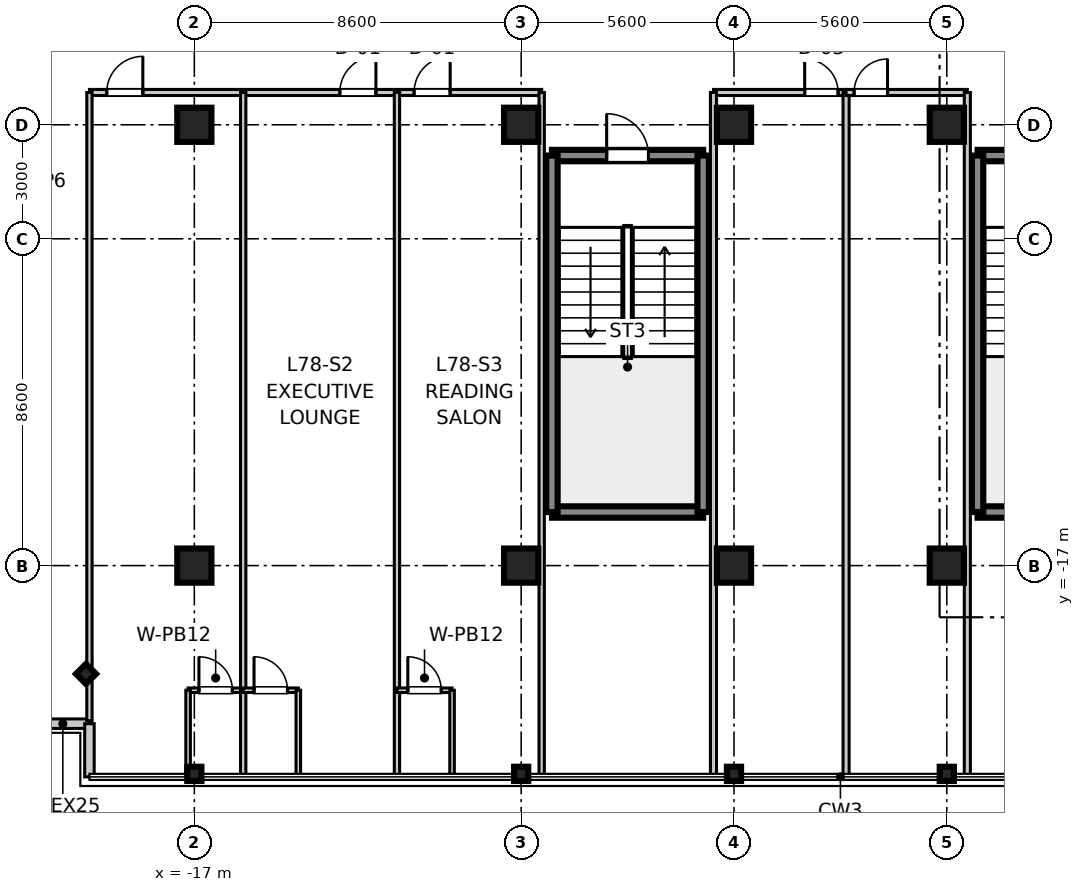
"""IFC4 building model, lengths in metres.
Left out: names, types, materials, properties, quantities, classifications, styles, units other than length and angle.
Written with IfcOpenShell. Run it as: python <this file> out.ifc"""

import sys

from ifc_helpers import new_model, si_unit, direction, frame, frame_2d, origin, origin_2d, place, context, subcontext, project, spatial, rectangle, i_section, extrude, source, transform, mapped, element, fill, save


model = new_model("IFC4")
c1 = context("Model", 3, precision=1e-05, world=origin(), true_north=direction((0.0, 1.0)))
c2 = subcontext(c1, "Body", "Model", "MODEL_VIEW")
j1 = project(units=[si_unit("LENGTHUNIT", "METRE"), si_unit("PLANEANGLEUNIT", "RADIAN")], contexts=[c1])
p1 = place(None, origin())
s1 = spatial("IfcSite", under=j1, at=p1, CompositionType="ELEMENT")
p2 = place(p1, origin())
s2 = spatial("IfcBuilding", under=s1, at=p2, CompositionType="ELEMENT")
p3 = place(p2, frame((0.0, 0.0, 304.2)))
s3 = spatial("IfcBuildingStorey", under=s2, at=p3, CompositionType="ELEMENT", Elevation=304.2)
m1 = source(origin(), c2, "Body", "SweptSolid", [
    extrude(rectangle(XDim=0.9, YDim=0.9, at=origin_2d()), origin(), (0.0, 0.0, 1.0), 3.805),
])
for number, where, z_axis, x_axis in (
    (1, (-17.0, -17.0, 0.0), (0.0, 0.0, 1.0), (1.0, 0.0, 0.0)),
    (2, (-17.0, -5.4, 0.0), (0.0, 0.0, 1.0), (1.0, 0.0, 0.0)),
    (3, (-8.4, -17.0, 0.0), (0.0, 0.0, 1.0), (1.0, 0.0, 0.0)),
    (4, (-8.4, -5.4, 0.0), (0.0, 0.0, 1.0), (1.0, 0.0, 0.0)),
    (5, (-2.8, -17.0, 0.0), (0.0, 0.0, 1.0), (1.0, 0.0, 0.0)),
    (6, (-2.8, -5.4, 0.0), (0.0, 0.0, 1.0), (1.0, 0.0, 0.0)),
    (7, (2.8, -17.0, 0.0), (0.0, 0.0, 1.0), (1.0, 0.0, 0.0)),
    (8, (2.8, -5.4, 0.0), (0.0, 0.0, 1.0), (1.0, 0.0, 0.0)),
):
    element("IfcColumn", number, at=place(p3, frame(where, z_axis=z_axis, x_axis=x_axis)), inside=s3, PredefinedType="COLUMN", context=c2, shape_type="MappedRepresentation", body=[
        mapped(m1, transform((0.0, 0.0, 0.0), scale=1.0)),
    ])
m2 = source(origin(), c2, "Body", "SweptSolid", [
    extrude(i_section(OverallWidth=0.374, OverallDepth=0.374, WebThickness=0.014, FlangeThickness=0.023, at=origin_2d()), origin(), (0.0, 0.0, 1.0), 3.805),
])
for number, where, z_axis, x_axis in (
    (9, (-17.0, -22.48, 0.0), (0.0, 0.0, 1.0), (0.0, 1.0, 0.0)),
    (10, (-8.4, -22.48, 0.0), (0.0, 0.0, 1.0), (0.0, 1.0, 0.0)),
    (11, (-2.8, -22.48, 0.0), (0.0, 0.0, 1.0), (0.0, 1.0, 0.0)),
    (12, (2.8, -22.48, 0.0), (0.0, 0.0, 1.0), (0.0, 1.0, 0.0)),
    (13, (-19.85, -19.85, 0.0), (0.0, 0.0, 1.0), (0.707, 0.707, 0.0)),
):
    element("IfcColumn", number, at=place(p3, frame(where, z_axis=z_axis, x_axis=x_axis)), inside=s3, PredefinedType="COLUMN", context=c2, shape_type="MappedRepresentation", body=[
        mapped(m2, transform((0.0, 0.0, 0.0), scale=1.0)),
    ])
m3 = source(origin(), c2, "Body", "SweptSolid", [
    extrude(rectangle(XDim=3.98, YDim=0.3, at=frame_2d((1.99, 0.0))), origin(), (0.0, 0.0, 1.0), 3.55),
])
for number, where, z_axis, x_axis in (
    (14, (3.61, -15.59, 0.0), (0.0, 0.0, 1.0), (1.0, 0.0, 0.0)),
    (15, (3.61, -6.21, 0.0), (0.0, 0.0, 1.0), (1.0, 0.0, 0.0)),
):
    element("IfcWall", number, at=place(p3, frame(where, z_axis=z_axis, x_axis=x_axis)), inside=s3, PredefinedType="SHEAR", context=c2, shape_type="MappedRepresentation", body=[
        mapped(m3, transform((0.0, 0.0, 0.0), scale=1.0)),
    ])
m4 = source(origin(), c2, "Body", "SweptSolid", [
    extrude(rectangle(XDim=9.38, YDim=0.3, at=frame_2d((4.69, 0.0))), origin(), (0.0, 0.0, 1.0), 3.55),
])
p4 = place(p3, frame((3.61, -15.59, 0.0), z_axis=(0.0, 0.0, 1.0), x_axis=(0.0, 1.0, 0.0)))
e16 = element("IfcWall", 16, at=p4, inside=s3, PredefinedType="SHEAR", context=c2, shape_type="MappedRepresentation", body=[
    mapped(m4, transform((0.0, 0.0, 0.0), scale=1.0)),
])
p5 = place(p3, frame((-7.59, -15.59, 0.0), z_axis=(0.0, 0.0, 1.0), x_axis=(1.0, 0.0, 0.0)))
e17 = element("IfcWall", 17, at=p5, inside=s3, PredefinedType="SHEAR", context=c2, shape_type="MappedRepresentation", body=[
    mapped(m3, transform((0.0, 0.0, 0.0), scale=1.0)),
])
p6 = place(p3, frame((-7.59, -6.21, 0.0), z_axis=(0.0, 0.0, 1.0), x_axis=(1.0, 0.0, 0.0)))
e18 = element("IfcWall", 18, at=p6, inside=s3, PredefinedType="SHEAR", context=c2, shape_type="MappedRepresentation", body=[
    mapped(m3, transform((0.0, 0.0, 0.0), scale=1.0)),
])
p7 = place(p6, frame((1.44, 0.0, 0.0)))
e19 = element("IfcOpeningElement", 19, at=p7, cuts=e18, PredefinedType="OPENING", context=c2, shape_type="SweptSolid", body=[
    extrude(rectangle(XDim=1.1, YDim=2.15, at=frame_2d((0.55, 1.075))), frame((0.0, 0.16, 0.0), z_axis=(0.0, -1.0, 0.0), x_axis=(1.0, 0.0, 0.0)), (0.0, 0.0, 1.0), 0.32),
])
for number, where, z_axis, x_axis in (
    (20, (-7.59, -15.59, 0.0), (0.0, 0.0, 1.0), (0.0, 1.0, 0.0)),
    (21, (-3.61, -15.59, 0.0), (0.0, 0.0, 1.0), (0.0, 1.0, 0.0)),
):
    element("IfcWall", number, at=place(p3, frame(where, z_axis=z_axis, x_axis=x_axis)), inside=s3, PredefinedType="SHEAR", context=c2, shape_type="MappedRepresentation", body=[
        mapped(m4, transform((0.0, 0.0, 0.0), scale=1.0)),
    ])
m5 = source(origin(), c2, "Body", "SweptSolid", [
    extrude(rectangle(XDim=1.4, YDim=0.25, at=frame_2d((0.7, 0.0))), origin(), (0.0, 0.0, 1.0), 3.55),
])
p8 = place(p3, frame((-21.16, -21.16, 0.0), z_axis=(0.0, 0.0, 1.0), x_axis=(1.0, 0.0, 0.0)))
e22 = element("IfcWall", 22, at=p8, inside=s3, PredefinedType="STANDARD", context=c2, shape_type="MappedRepresentation", body=[
    mapped(m5, transform((0.0, 0.0, 0.0), scale=1.0)),
])
m6 = source(origin(), c2, "Body", "SweptSolid", [
    extrude(rectangle(XDim=1.4, YDim=0.25, at=frame_2d((0.7, 0.0))), origin(), (0.0, 0.0, 1.0), 3.55),
])
p9 = place(p3, frame((-19.76, -22.56, 0.0), z_axis=(0.0, 0.0, 1.0), x_axis=(0.0, 1.0, 0.0)))
e23 = element("IfcWall", 23, at=p9, inside=s3, PredefinedType="STANDARD", context=c2, shape_type="MappedRepresentation", body=[
    mapped(m6, transform((0.0, 0.0, 0.0), scale=1.0)),
])
m7 = source(origin(), c2, "Body", "SweptSolid", [
    extrude(rectangle(XDim=11.9, YDim=0.16, at=frame_2d((5.95, 0.0))), origin(), (0.0, 0.0, 1.0), 2.89),
])
p10 = place(p3, frame((-19.76, -4.55, 0.0), z_axis=(0.0, 0.0, 1.0), x_axis=(1.0, 0.0, 0.0)))
e24 = element("IfcWall", 24, at=p10, inside=s3, PredefinedType="PARTITIONING", context=c2, shape_type="MappedRepresentation", body=[
    mapped(m7, transform((0.0, 0.0, 0.0), scale=1.0)),
])
p11 = place(p10, frame((0.455, 0.0, 0.0)))
e25 = element("IfcOpeningElement", 25, at=p11, cuts=e24, PredefinedType="OPENING", context=c2, shape_type="SweptSolid", body=[
    extrude(rectangle(XDim=0.95, YDim=2.1, at=frame_2d((0.475, 1.05))), frame((0.0, 0.09, 0.0), z_axis=(0.0, -1.0, 0.0), x_axis=(1.0, 0.0, 0.0)), (0.0, 0.0, 1.0), 0.18),
])
p12 = place(p10, frame((6.588, 0.0, 0.0)))
e26 = element("IfcOpeningElement", 26, at=p12, cuts=e24, PredefinedType="OPENING", context=c2, shape_type="SweptSolid", body=[
    extrude(rectangle(XDim=0.95, YDim=2.1, at=frame_2d((0.475, 1.05))), frame((0.0, 0.09, 0.0), z_axis=(0.0, -1.0, 0.0), x_axis=(1.0, 0.0, 0.0)), (0.0, 0.0, 1.0), 0.18),
])
p13 = place(p10, frame((8.542, 0.0, 0.0)))
e27 = element("IfcOpeningElement", 27, at=p13, cuts=e24, PredefinedType="OPENING", context=c2, shape_type="SweptSolid", body=[
    extrude(rectangle(XDim=0.95, YDim=2.1, at=frame_2d((0.475, 1.05))), frame((0.0, 0.09, 0.0), z_axis=(0.0, -1.0, 0.0), x_axis=(1.0, 0.0, 0.0)), (0.0, 0.0, 1.0), 0.18),
])
m8 = source(origin(), c2, "Body", "SweptSolid", [
    extrude(rectangle(XDim=16.53, YDim=0.14, at=frame_2d((8.265, 0.0))), origin(), (0.0, 0.0, 1.0), 2.89),
])
p14 = place(p3, frame((-19.76, -21.08, 0.0), z_axis=(0.0, 0.0, 1.0), x_axis=(0.0, 1.0, 0.0)))
e28 = element("IfcWall", 28, at=p14, inside=s3, PredefinedType="PARTITIONING", context=c2, shape_type="MappedRepresentation", body=[
    mapped(m8, transform((0.0, 0.0, 0.0), scale=1.0)),
])
m9 = source(origin(), c2, "Body", "SweptSolid", [
    extrude(rectangle(XDim=17.95, YDim=0.14, at=frame_2d((8.975, 0.0))), origin(), (0.0, 0.0, 1.0), 2.89),
])
p15 = place(p3, frame((-7.86, -22.5, 0.0), z_axis=(0.0, 0.0, 1.0), x_axis=(0.0, 1.0, 0.0)))
e29 = element("IfcWall", 29, at=p15, inside=s3, PredefinedType="PARTITIONING", context=c2, shape_type="MappedRepresentation", body=[
    mapped(m9, transform((0.0, 0.0, 0.0), scale=1.0)),
])
m10 = source(origin(), c2, "Body", "SweptSolid", [
    extrude(rectangle(XDim=1.45, YDim=0.12, at=frame_2d((0.725, 0.0))), origin(), (0.0, 0.0, 1.0), 2.89),
])
p16 = place(p3, frame((-17.164, -20.28, 0.0), z_axis=(0.0, 0.0, 1.0), x_axis=(1.0, 0.0, 0.0)))
e30 = element("IfcWall", 30, at=p16, inside=s3, PredefinedType="PARTITIONING", context=c2, shape_type="MappedRepresentation", body=[
    mapped(m10, transform((0.0, 0.0, 0.0), scale=1.0)),
])
p17 = place(p16, frame((0.285, 0.0, 0.0)))
e31 = element("IfcOpeningElement", 31, at=p17, cuts=e30, PredefinedType="OPENING", context=c2, shape_type="SweptSolid", body=[
    extrude(rectangle(XDim=0.88, YDim=2.1, at=frame_2d((0.44, 1.05))), frame((0.0, 0.07, 0.0), z_axis=(0.0, -1.0, 0.0), x_axis=(1.0, 0.0, 0.0)), (0.0, 0.0, 1.0), 0.14),
])
m11 = source(origin(), c2, "Body", "SweptSolid", [
    extrude(rectangle(XDim=2.22, YDim=0.12, at=frame_2d((1.11, 0.0))), origin(), (0.0, 0.0, 1.0), 2.89),
])
p18 = place(p3, frame((-17.164, -22.5, 0.0), z_axis=(0.0, 0.0, 1.0), x_axis=(0.0, 1.0, 0.0)))
e32 = element("IfcWall", 32, at=p18, inside=s3, PredefinedType="PARTITIONING", context=c2, shape_type="MappedRepresentation", body=[
    mapped(m11, transform((0.0, 0.0, 0.0), scale=1.0)),
])
p19 = place(p3, frame((-15.714, -22.5, 0.0), z_axis=(0.0, 0.0, 1.0), x_axis=(0.0, 1.0, 0.0)))
e33 = element("IfcWall", 33, at=p19, inside=s3, PredefinedType="PARTITIONING", context=c2, shape_type="MappedRepresentation", body=[
    mapped(m9, transform((0.0, 0.0, 0.0), scale=1.0)),
])
m12 = source(origin(), c2, "Body", "SweptSolid", [
    extrude(rectangle(XDim=1.45, YDim=0.12, at=frame_2d((0.725, 0.0))), origin(), (0.0, 0.0, 1.0), 2.89),
])
p20 = place(p3, frame((-15.714, -20.28, 0.0), z_axis=(0.0, 0.0, 1.0), x_axis=(1.0, 0.0, 0.0)))
e34 = element("IfcWall", 34, at=p20, inside=s3, PredefinedType="PARTITIONING", context=c2, shape_type="MappedRepresentation", body=[
    mapped(m12, transform((0.0, 0.0, 0.0), scale=1.0)),
])
p21 = place(p20, frame((0.285, 0.0, 0.0)))
e35 = element("IfcOpeningElement", 35, at=p21, cuts=e34, PredefinedType="OPENING", context=c2, shape_type="SweptSolid", body=[
    extrude(rectangle(XDim=0.88, YDim=2.1, at=frame_2d((0.44, 1.05))), frame((0.0, 0.07, 0.0), z_axis=(0.0, -1.0, 0.0), x_axis=(1.0, 0.0, 0.0)), (0.0, 0.0, 1.0), 0.14),
])
p22 = place(p3, frame((-14.264, -22.5, 0.0), z_axis=(0.0, 0.0, 1.0), x_axis=(0.0, 1.0, 0.0)))
e36 = element("IfcWall", 36, at=p22, inside=s3, PredefinedType="PARTITIONING", context=c2, shape_type="MappedRepresentation", body=[
    mapped(m11, transform((0.0, 0.0, 0.0), scale=1.0)),
])
p23 = place(p3, frame((-11.668, -22.5, 0.0), z_axis=(0.0, 0.0, 1.0), x_axis=(0.0, 1.0, 0.0)))
e37 = element("IfcWall", 37, at=p23, inside=s3, PredefinedType="PARTITIONING", context=c2, shape_type="MappedRepresentation", body=[
    mapped(m9, transform((0.0, 0.0, 0.0), scale=1.0)),
])
p24 = place(p3, frame((-11.668, -20.28, 0.0), z_axis=(0.0, 0.0, 1.0), x_axis=(1.0, 0.0, 0.0)))
e38 = element("IfcWall", 38, at=p24, inside=s3, PredefinedType="PARTITIONING", context=c2, shape_type="MappedRepresentation", body=[
    mapped(m10, transform((0.0, 0.0, 0.0), scale=1.0)),
])
p25 = place(p24, frame((0.285, 0.0, 0.0)))
e39 = element("IfcOpeningElement", 39, at=p25, cuts=e38, PredefinedType="OPENING", context=c2, shape_type="SweptSolid", body=[
    extrude(rectangle(XDim=0.88, YDim=2.1, at=frame_2d((0.44, 1.05))), frame((0.0, 0.07, 0.0), z_axis=(0.0, -1.0, 0.0), x_axis=(1.0, 0.0, 0.0)), (0.0, 0.0, 1.0), 0.14),
])
p26 = place(p3, frame((-10.218, -22.5, 0.0), z_axis=(0.0, 0.0, 1.0), x_axis=(0.0, 1.0, 0.0)))
e40 = element("IfcWall", 40, at=p26, inside=s3, PredefinedType="PARTITIONING", context=c2, shape_type="MappedRepresentation", body=[
    mapped(m11, transform((0.0, 0.0, 0.0), scale=1.0)),
])
m13 = source(origin(), c2, "Body", "SweptSolid", [
    extrude(rectangle(XDim=3.49, YDim=0.16, at=frame_2d((1.745, 0.0))), origin(), (0.0, 0.0, 1.0), 2.89),
])
p27 = place(p3, frame((-3.34, -4.55, 0.0), z_axis=(0.0, 0.0, 1.0), x_axis=(1.0, 0.0, 0.0)))
e41 = element("IfcWall", 41, at=p27, inside=s3, PredefinedType="PARTITIONING", context=c2, shape_type="MappedRepresentation", body=[
    mapped(m13, transform((0.0, 0.0, 0.0), scale=1.0)),
])
p28 = place(p27, frame((2.4, 0.0, 0.0)))
e42 = element("IfcOpeningElement", 42, at=p28, cuts=e41, PredefinedType="OPENING", context=c2, shape_type="SweptSolid", body=[
    extrude(rectangle(XDim=0.88, YDim=2.1, at=frame_2d((0.44, 1.05))), frame((0.0, 0.09, 0.0), z_axis=(0.0, -1.0, 0.0), x_axis=(1.0, 0.0, 0.0)), (0.0, 0.0, 1.0), 0.18),
])
m14 = source(origin(), c2, "Body", "SweptSolid", [
    extrude(rectangle(XDim=17.95, YDim=0.16, at=frame_2d((8.975, 0.0))), origin(), (0.0, 0.0, 1.0), 2.89),
])
for number, where, z_axis, x_axis in (
    (43, (-3.34, -22.5, 0.0), (0.0, 0.0, 1.0), (0.0, 1.0, 0.0)),
    (44, (0.15, -22.5, 0.0), (0.0, 0.0, 1.0), (0.0, 1.0, 0.0)),
):
    element("IfcWall", number, at=place(p3, frame(where, z_axis=z_axis, x_axis=x_axis)), inside=s3, PredefinedType="PARTITIONING", context=c2, shape_type="MappedRepresentation", body=[
        mapped(m14, transform((0.0, 0.0, 0.0), scale=1.0)),
    ])
m15 = source(origin(), c2, "Body", "SweptSolid", [
    extrude(rectangle(XDim=3.19, YDim=0.16, at=frame_2d((1.595, 0.0))), origin(), (0.0, 0.0, 1.0), 2.89),
])
p29 = place(p3, frame((0.15, -4.55, 0.0), z_axis=(0.0, 0.0, 1.0), x_axis=(1.0, 0.0, 0.0)))
e45 = element("IfcWall", 45, at=p29, inside=s3, PredefinedType="PARTITIONING", context=c2, shape_type="MappedRepresentation", body=[
    mapped(m15, transform((0.0, 0.0, 0.0), scale=1.0)),
])
p30 = place(p29, frame((0.21, 0.0, 0.0)))
e46 = element("IfcOpeningElement", 46, at=p30, cuts=e45, PredefinedType="OPENING", context=c2, shape_type="SweptSolid", body=[
    extrude(rectangle(XDim=0.88, YDim=2.1, at=frame_2d((0.44, 1.05))), frame((0.0, 0.09, 0.0), z_axis=(0.0, -1.0, 0.0), x_axis=(1.0, 0.0, 0.0)), (0.0, 0.0, 1.0), 0.18),
])
p31 = place(p3, frame((3.34, -22.5, 0.0), z_axis=(0.0, 0.0, 1.0), x_axis=(0.0, 1.0, 0.0)))
e47 = element("IfcWall", 47, at=p31, inside=s3, PredefinedType="PARTITIONING", context=c2, shape_type="MappedRepresentation", body=[
    mapped(m14, transform((0.0, 0.0, 0.0), scale=1.0)),
])
m16 = source(origin(), c2, "Body", "SweptSolid", [
    extrude(rectangle(XDim=1.1, YDim=2.15, at=frame_2d((0.55, 1.075))), frame((0.0, 0.025, 0.0), z_axis=(0.0, -1.0, 0.0), x_axis=(1.0, 0.0, 0.0)), (0.0, 0.0, 1.0), 0.05),
])
p32 = place(p7, frame((1.1, 0.0, 0.0), z_axis=(0.0, 0.0, 1.0), x_axis=(-1.0, 0.0, 0.0)))
e48 = element("IfcDoor", 48, at=p32, inside=s3, OperationType="SINGLE_SWING_LEFT", PredefinedType="DOOR", context=c2, shape_type="MappedRepresentation", body=[
    mapped(m16, transform((0.0, 0.0, 0.0), scale=1.0)),
])
fill(e19, e48)
m17 = source(origin(), c2, "Body", "SweptSolid", [
    extrude(rectangle(XDim=0.88, YDim=2.1, at=frame_2d((0.44, 1.05))), frame((0.0, 0.025, 0.0), z_axis=(0.0, -1.0, 0.0), x_axis=(1.0, 0.0, 0.0)), (0.0, 0.0, 1.0), 0.05),
])
p33 = place(p17, frame((0.88, 0.0, 0.0), z_axis=(0.0, 0.0, 1.0), x_axis=(-1.0, 0.0, 0.0)))
e49 = element("IfcDoor", 49, at=p33, inside=s3, OperationType="SINGLE_SWING_LEFT", PredefinedType="DOOR", context=c2, shape_type="MappedRepresentation", body=[
    mapped(m17, transform((0.0, 0.0, 0.0), scale=1.0)),
])
fill(e31, e49)
m18 = source(origin(), c2, "Body", "SweptSolid", [
    extrude(rectangle(XDim=0.95, YDim=2.1, at=frame_2d((0.475, 1.05))), frame((0.0, 0.025, 0.0), z_axis=(0.0, -1.0, 0.0), x_axis=(1.0, 0.0, 0.0)), (0.0, 0.0, 1.0), 0.05),
])
p34 = place(p11, frame((0.95, 0.0, 0.0), z_axis=(0.0, 0.0, 1.0), x_axis=(-1.0, 0.0, 0.0)))
e50 = element("IfcDoor", 50, at=p34, inside=s3, OperationType="SINGLE_SWING_RIGHT", PredefinedType="DOOR", context=c2, shape_type="MappedRepresentation", body=[
    mapped(m18, transform((0.0, 0.0, 0.0), scale=1.0)),
])
fill(e25, e50)
p35 = place(p21, frame((0.88, 0.0, 0.0), z_axis=(0.0, 0.0, 1.0), x_axis=(-1.0, 0.0, 0.0)))
e51 = element("IfcDoor", 51, at=p35, inside=s3, OperationType="SINGLE_SWING_LEFT", PredefinedType="DOOR", context=c2, shape_type="MappedRepresentation", body=[
    mapped(m17, transform((0.0, 0.0, 0.0), scale=1.0)),
])
fill(e35, e51)
p36 = place(p12, frame((0.95, 0.0, 0.0), z_axis=(0.0, 0.0, 1.0), x_axis=(-1.0, 0.0, 0.0)))
e52 = element("IfcDoor", 52, at=p36, inside=s3, OperationType="SINGLE_SWING_RIGHT", PredefinedType="DOOR", context=c2, shape_type="MappedRepresentation", body=[
    mapped(m18, transform((0.0, 0.0, 0.0), scale=1.0)),
])
fill(e26, e52)
p37 = place(p25, frame((0.88, 0.0, 0.0), z_axis=(0.0, 0.0, 1.0), x_axis=(-1.0, 0.0, 0.0)))
e53 = element("IfcDoor", 53, at=p37, inside=s3, OperationType="SINGLE_SWING_LEFT", PredefinedType="DOOR", context=c2, shape_type="MappedRepresentation", body=[
    mapped(m17, transform((0.0, 0.0, 0.0), scale=1.0)),
])
fill(e39, e53)
p38 = place(p13, frame((0.95, 0.0, 0.0), z_axis=(0.0, 0.0, 1.0), x_axis=(-1.0, 0.0, 0.0)))
e54 = element("IfcDoor", 54, at=p38, inside=s3, OperationType="SINGLE_SWING_RIGHT", PredefinedType="DOOR", context=c2, shape_type="MappedRepresentation", body=[
    mapped(m18, transform((0.0, 0.0, 0.0), scale=1.0)),
])
fill(e27, e54)
p39 = place(p28, frame((0.88, 0.0, 0.0), z_axis=(0.0, 0.0, 1.0), x_axis=(-1.0, 0.0, 0.0)))
e55 = element("IfcDoor", 55, at=p39, inside=s3, OperationType="SINGLE_SWING_LEFT", PredefinedType="DOOR", context=c2, shape_type="MappedRepresentation", body=[
    mapped(m17, transform((0.0, 0.0, 0.0), scale=1.0)),
])
fill(e42, e55)
p40 = place(p30, frame((0.88, 0.0, 0.0), z_axis=(0.0, 0.0, 1.0), x_axis=(-1.0, 0.0, 0.0)))
e56 = element("IfcDoor", 56, at=p40, inside=s3, OperationType="SINGLE_SWING_RIGHT", PredefinedType="DOOR", context=c2, shape_type="MappedRepresentation", body=[
    mapped(m17, transform((0.0, 0.0, 0.0), scale=1.0)),
])
fill(e46, e56)
save(model, sys.argv[1])
